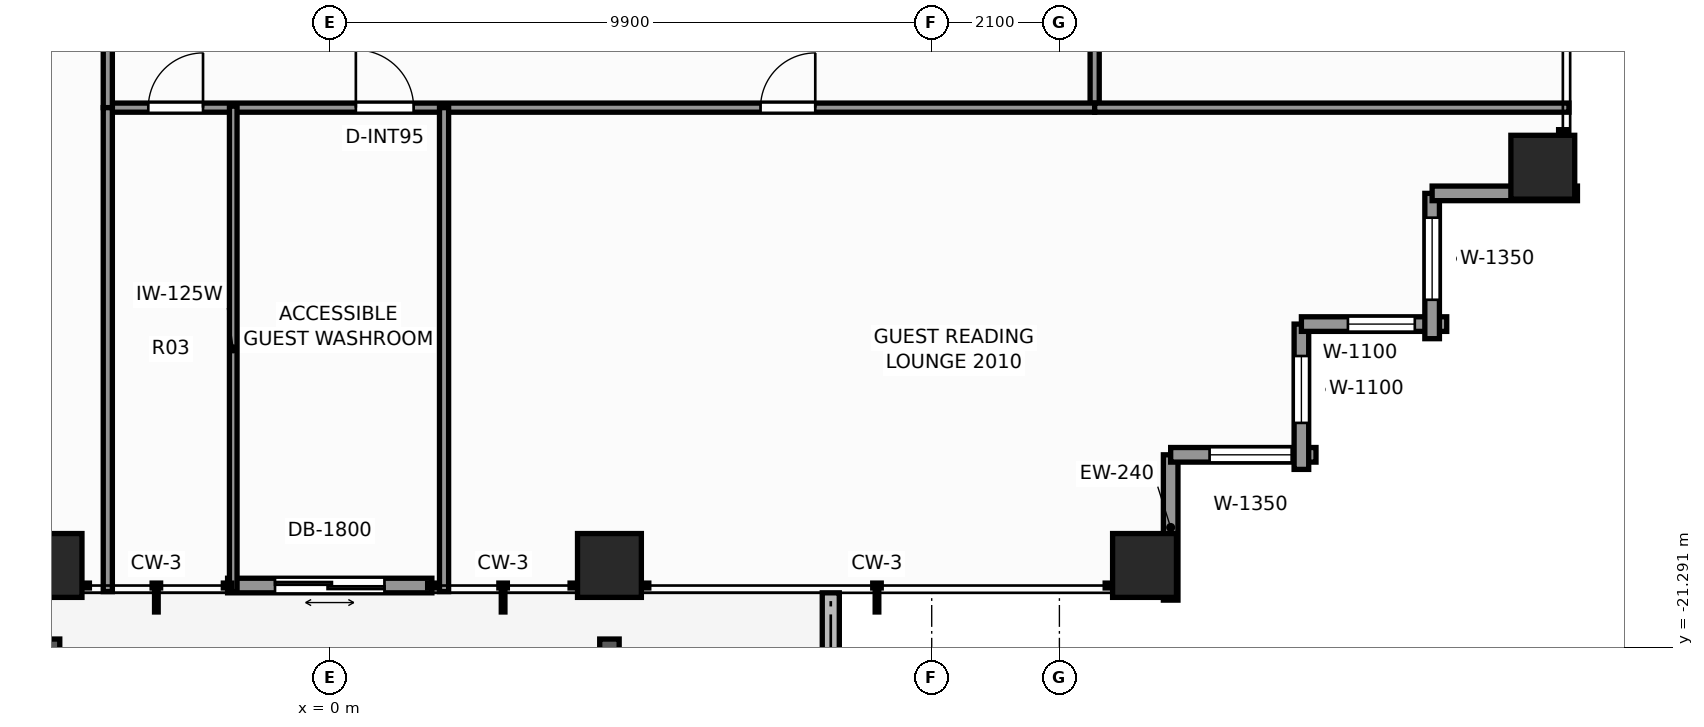
"""IFC4 building model, lengths in metres.
Left out: names, types, materials, properties, quantities, classifications, styles, units other than length and angle.
Written with IfcOpenShell. Run it as: python <this file> out.ifc"""

import sys

from ifc_helpers import new_model, si_unit, direction, frame, frame_2d, origin, origin_2d, place, context, subcontext, project, spatial, rectangle, extrude, element, fill, save


model = new_model("IFC4")
c1 = context("Model", 3, precision=1e-05, world=origin(), true_north=direction((0.0, 1.0)))
c2 = subcontext(c1, "Body", "Model", "MODEL_VIEW")
j1 = project(units=[si_unit("LENGTHUNIT", "METRE"), si_unit("PLANEANGLEUNIT", "RADIAN")], contexts=[c1])
p1 = place(None, origin())
s1 = spatial("IfcSite", under=j1, at=p1, CompositionType="ELEMENT")
p2 = place(p1, origin())
s2 = spatial("IfcBuilding", under=s1, at=p2, CompositionType="ELEMENT")
p3 = place(p2, frame((0.0, 0.0, 72.2)))
s3 = spatial("IfcBuildingStorey", under=s2, at=p3, CompositionType="ELEMENT", Elevation=72.2)
for number, where, z_axis, x_axis in (
    (1, (-4.6, -19.95, 0.0), (0.0, 0.0, 1.0), (1.0, 0.0, 0.0)),
    (2, (4.6, -19.95, 0.0), (0.0, 0.0, 1.0), (1.0, 0.0, 0.0)),
    (3, (13.4, -19.95, 0.0), (0.0, 0.0, 1.0), (1.0, 0.0, 0.0)),
    (4, (19.95, -13.4, 0.0), (0.0, 0.0, 1.0), (1.0, 0.0, 0.0)),
):
    element("IfcColumn", number, at=place(p3, frame(where, z_axis=z_axis, x_axis=x_axis)), inside=s3, PredefinedType="COLUMN", context=c2, shape_type="SweptSolid", body=[
        extrude(rectangle(XDim=1.05, YDim=1.05, at=origin_2d()), origin(), (0.0, 0.0, 1.0), 3.3),
    ])
p4 = place(p3, frame((8.24, -23.074, -0.04), z_axis=(0.0, 0.0, 1.0), x_axis=(0.0, 1.0, 0.0)))
e5 = element("IfcWall", 5, at=p4, inside=s3, PredefinedType="PARAPET", context=c2, shape_type="SweptSolid", body=[
    extrude(rectangle(XDim=2.674, YDim=0.28, at=frame_2d((1.337, 0.0))), origin(), (0.0, 0.0, 1.0), 0.42),
])
p5 = place(p3, frame((1.68, -20.28, 0.0), z_axis=(0.0, 0.0, 1.0), x_axis=(-1.0, 0.0, 0.0)))
e6 = element("IfcWall", 6, at=p5, inside=s3, PredefinedType="STANDARD", context=c2, shape_type="SweptSolid", body=[
    extrude(rectangle(XDim=3.36, YDim=0.24, at=frame_2d((1.68, 0.0))), origin(), (0.0, 0.0, 1.0), 3.08),
])
p6 = place(p5, frame((0.78, 0.0, 0.0)))
e7 = element("IfcOpeningElement", 7, at=p6, cuts=e6, PredefinedType="OPENING", context=c2, shape_type="SweptSolid", body=[
    extrude(rectangle(XDim=1.8, YDim=2.2, at=frame_2d((0.9, 1.1))), frame((0.0, 0.13, 0.0), z_axis=(0.0, -1.0, 0.0), x_axis=(1.0, 0.0, 0.0)), (0.0, 0.0, 1.0), 0.26),
])
p7 = place(p3, frame((13.83, -18.13, 0.0), z_axis=(0.0, 0.0, 1.0), x_axis=(0.0, -1.0, 0.0)))
e8 = element("IfcWall", 8, at=p7, inside=s3, PredefinedType="STANDARD", context=c2, shape_type="SweptSolid", body=[
    extrude(rectangle(XDim=2.39, YDim=0.24, at=frame_2d((1.195, 0.0))), origin(), (0.0, 0.0, 1.0), 2.459),
])
p8 = place(p3, frame((16.22, -18.13, 0.0), z_axis=(0.0, 0.0, 1.0), x_axis=(-1.0, 0.0, 0.0)))
e9 = element("IfcWall", 9, at=p8, inside=s3, PredefinedType="STANDARD", context=c2, shape_type="SweptSolid", body=[
    extrude(rectangle(XDim=2.39, YDim=0.24, at=frame_2d((1.195, 0.0))), origin(), (0.0, 0.0, 1.0), 2.459),
])
p9 = place(p8, frame((0.4, 0.0, 0.65)))
e10 = element("IfcOpeningElement", 10, at=p9, cuts=e9, PredefinedType="OPENING", context=c2, shape_type="SweptSolid", body=[
    extrude(rectangle(XDim=1.35, YDim=1.55, at=frame_2d((0.675, 0.775))), frame((0.0, 0.13, 0.0), z_axis=(0.0, -1.0, 0.0), x_axis=(1.0, 0.0, 0.0)), (0.0, 0.0, 1.0), 0.26),
])
p10 = place(p3, frame((15.98, -15.98, 0.0), z_axis=(0.0, 0.0, 1.0), x_axis=(0.0, -1.0, 0.0)))
e11 = element("IfcWall", 11, at=p10, inside=s3, PredefinedType="STANDARD", context=c2, shape_type="SweptSolid", body=[
    extrude(rectangle(XDim=2.39, YDim=0.24, at=frame_2d((1.195, 0.0))), origin(), (0.0, 0.0, 1.0), 2.459),
])
p11 = place(p10, frame((0.525, 0.0, 0.65)))
e12 = element("IfcOpeningElement", 12, at=p11, cuts=e11, PredefinedType="OPENING", context=c2, shape_type="SweptSolid", body=[
    extrude(rectangle(XDim=1.1, YDim=1.45, at=frame_2d((0.55, 0.725))), frame((0.0, 0.13, 0.0), z_axis=(0.0, -1.0, 0.0), x_axis=(1.0, 0.0, 0.0)), (0.0, 0.0, 1.0), 0.26),
])
p12 = place(p3, frame((18.37, -15.98, 0.0), z_axis=(0.0, 0.0, 1.0), x_axis=(-1.0, 0.0, 0.0)))
e13 = element("IfcWall", 13, at=p12, inside=s3, PredefinedType="STANDARD", context=c2, shape_type="SweptSolid", body=[
    extrude(rectangle(XDim=2.39, YDim=0.24, at=frame_2d((1.195, 0.0))), origin(), (0.0, 0.0, 1.0), 2.459),
])
p13 = place(p12, frame((0.525, 0.0, 0.65)))
e14 = element("IfcOpeningElement", 14, at=p13, cuts=e13, PredefinedType="OPENING", context=c2, shape_type="SweptSolid", body=[
    extrude(rectangle(XDim=1.1, YDim=1.45, at=frame_2d((0.55, 0.725))), frame((0.0, 0.13, 0.0), z_axis=(0.0, -1.0, 0.0), x_axis=(1.0, 0.0, 0.0)), (0.0, 0.0, 1.0), 0.26),
])
p14 = place(p3, frame((18.13, -13.83, 0.0), z_axis=(0.0, 0.0, 1.0), x_axis=(0.0, -1.0, 0.0)))
e15 = element("IfcWall", 15, at=p14, inside=s3, PredefinedType="STANDARD", context=c2, shape_type="SweptSolid", body=[
    extrude(rectangle(XDim=2.39, YDim=0.24, at=frame_2d((1.195, 0.0))), origin(), (0.0, 0.0, 1.0), 2.459),
])
p15 = place(p14, frame((0.4, 0.0, 0.65)))
e16 = element("IfcOpeningElement", 16, at=p15, cuts=e15, PredefinedType="OPENING", context=c2, shape_type="SweptSolid", body=[
    extrude(rectangle(XDim=1.35, YDim=1.55, at=frame_2d((0.675, 0.775))), frame((0.0, 0.13, 0.0), z_axis=(0.0, -1.0, 0.0), x_axis=(1.0, 0.0, 0.0)), (0.0, 0.0, 1.0), 0.26),
])
p16 = place(p3, frame((20.52, -13.83, 0.0), z_axis=(0.0, 0.0, 1.0), x_axis=(-1.0, 0.0, 0.0)))
e17 = element("IfcWall", 17, at=p16, inside=s3, PredefinedType="STANDARD", context=c2, shape_type="SweptSolid", body=[
    extrude(rectangle(XDim=2.39, YDim=0.24, at=frame_2d((1.195, 0.0))), origin(), (0.0, 0.0, 1.0), 2.459),
])
p17 = place(p3, frame((12.58, -12.42, 0.0), z_axis=(0.0, 0.0, 1.0), x_axis=(0.0, 1.0, 0.0)))
e18 = element("IfcWall", 18, at=p17, inside=s3, PredefinedType="PARTITIONING", context=c2, shape_type="SweptSolid", body=[
    extrude(rectangle(XDim=24.84, YDim=0.15, at=frame_2d((12.42, 0.0))), origin(), (0.0, 0.0, 1.0), 2.292),
])
p18 = place(p17, frame((4.435, 0.0, 0.0)))
e19 = element("IfcOpeningElement", 19, at=p18, cuts=e18, PredefinedType="OPENING", context=c2, shape_type="SweptSolid", body=[
    extrude(rectangle(XDim=0.9, YDim=2.06, at=frame_2d((0.45, 1.03))), frame((0.0, 0.085, 0.0), z_axis=(0.0, -1.0, 0.0), x_axis=(1.0, 0.0, 0.0)), (0.0, 0.0, 1.0), 0.17),
])
p19 = place(p17, frame((13.941, 0.0, 0.0)))
e20 = element("IfcOpeningElement", 20, at=p19, cuts=e18, PredefinedType="OPENING", context=c2, shape_type="SweptSolid", body=[
    extrude(rectangle(XDim=0.9, YDim=2.06, at=frame_2d((0.45, 1.03))), frame((0.0, 0.085, 0.0), z_axis=(0.0, -1.0, 0.0), x_axis=(1.0, 0.0, 0.0)), (0.0, 0.0, 1.0), 0.17),
])
p20 = place(p17, frame((18.322, 0.0, 0.0)))
e21 = element("IfcOpeningElement", 21, at=p20, cuts=e18, PredefinedType="OPENING", context=c2, shape_type="SweptSolid", body=[
    extrude(rectangle(XDim=0.9, YDim=2.06, at=frame_2d((0.45, 1.03))), frame((0.0, 0.085, 0.0), z_axis=(0.0, -1.0, 0.0), x_axis=(1.0, 0.0, 0.0)), (0.0, 0.0, 1.0), 0.17),
])
p21 = place(p17, frame((20.442, 0.0, 0.0)))
e22 = element("IfcOpeningElement", 22, at=p21, cuts=e18, PredefinedType="OPENING", context=c2, shape_type="SweptSolid", body=[
    extrude(rectangle(XDim=0.95, YDim=2.06, at=frame_2d((0.475, 1.03))), frame((0.0, 0.085, 0.0), z_axis=(0.0, -1.0, 0.0), x_axis=(1.0, 0.0, 0.0)), (0.0, 0.0, 1.0), 0.17),
])
p22 = place(p3, frame((-3.65, -12.42, 0.0), z_axis=(0.0, 0.0, 1.0), x_axis=(1.0, 0.0, 0.0)))
e23 = element("IfcWall", 23, at=p22, inside=s3, PredefinedType="PARTITIONING", context=c2, shape_type="SweptSolid", body=[
    extrude(rectangle(XDim=16.23, YDim=0.15, at=frame_2d((8.115, 0.0))), origin(), (0.0, 0.0, 1.0), 2.292),
])
p23 = place(p22, frame((0.666, 0.0, 0.0)))
e24 = element("IfcOpeningElement", 24, at=p23, cuts=e23, PredefinedType="OPENING", context=c2, shape_type="SweptSolid", body=[
    extrude(rectangle(XDim=0.9, YDim=2.06, at=frame_2d((0.45, 1.03))), frame((0.0, 0.085, 0.0), z_axis=(0.0, -1.0, 0.0), x_axis=(1.0, 0.0, 0.0)), (0.0, 0.0, 1.0), 0.17),
])
p24 = place(p22, frame((4.08, 0.0, 0.0)))
e25 = element("IfcOpeningElement", 25, at=p24, cuts=e23, PredefinedType="OPENING", context=c2, shape_type="SweptSolid", body=[
    extrude(rectangle(XDim=0.95, YDim=2.06, at=frame_2d((0.475, 1.03))), frame((0.0, 0.085, 0.0), z_axis=(0.0, -1.0, 0.0), x_axis=(1.0, 0.0, 0.0)), (0.0, 0.0, 1.0), 0.17),
])
p25 = place(p22, frame((10.735, 0.0, 0.0)))
e26 = element("IfcOpeningElement", 26, at=p25, cuts=e23, PredefinedType="OPENING", context=c2, shape_type="SweptSolid", body=[
    extrude(rectangle(XDim=0.9, YDim=2.06, at=frame_2d((0.45, 1.03))), frame((0.0, 0.085, 0.0), z_axis=(0.0, -1.0, 0.0), x_axis=(1.0, 0.0, 0.0)), (0.0, 0.0, 1.0), 0.17),
])
p26 = place(p3, frame((-3.65, -12.42, 0.0), z_axis=(0.0, 0.0, 1.0), x_axis=(0.0, 1.0, 0.0)))
e27 = element("IfcWall", 27, at=p26, inside=s3, PredefinedType="PARTITIONING", context=c2, shape_type="SweptSolid", body=[
    extrude(rectangle(XDim=2.52, YDim=0.15, at=frame_2d((1.26, 0.0))), origin(), (0.0, 0.0, 1.0), 3.08),
])
p27 = place(p3, frame((12.58, -12.42, 0.0), z_axis=(0.0, 0.0, 1.0), x_axis=(1.0, 0.0, 0.0)))
e28 = element("IfcWall", 28, at=p27, inside=s3, PredefinedType="PARTITIONING", context=c2, shape_type="SweptSolid", body=[
    extrude(rectangle(XDim=7.8, YDim=0.15, at=frame_2d((3.9, 0.0))), origin(), (0.0, 0.0, 1.0), 2.292),
])
for number, where, z_axis, x_axis in (
    (29, (-3.65, -20.38, 0.0), (0.0, 0.0, 1.0), (0.0, 1.0, 0.0)),
    (30, (1.88, -20.38, 0.0), (0.0, 0.0, 1.0), (0.0, 1.0, 0.0)),
):
    element("IfcWall", number, at=place(p3, frame(where, z_axis=z_axis, x_axis=x_axis)), inside=s3, PredefinedType="PARTITIONING", context=c2, shape_type="SweptSolid", body=[
        extrude(rectangle(XDim=7.96, YDim=0.15, at=frame_2d((3.98, 0.0))), origin(), (0.0, 0.0, 1.0), 2.449),
    ])
p28 = place(p3, frame((-1.587, -20.38, 0.0), z_axis=(0.0, 0.0, 1.0), x_axis=(0.0, 1.0, 0.0)))
e31 = element("IfcWall", 31, at=p28, inside=s3, PredefinedType="PARTITIONING", context=c2, shape_type="SweptSolid", body=[
    extrude(rectangle(XDim=7.985, YDim=0.125, at=frame_2d((3.992, 0.0))), origin(), (0.0, 0.0, 1.0), 2.449),
])
p29 = place(p6, origin())
e32 = element("IfcDoor", 32, at=p29, inside=s3, OperationType="DOUBLE_DOOR_SLIDING", PredefinedType="DOOR", context=c2, shape_type="SweptSolid", body=[
    extrude(rectangle(XDim=1.8, YDim=2.2, at=frame_2d((0.9, 1.1))), frame((0.0, 0.025, 0.0), z_axis=(0.0, -1.0, 0.0), x_axis=(1.0, 0.0, 0.0)), (0.0, 0.0, 1.0), 0.05),
])
fill(e7, e32)
p30 = place(p9, origin())
e33 = element("IfcWindow", 33, at=p30, inside=s3, PartitioningType="SINGLE_PANEL", PredefinedType="WINDOW", context=c2, shape_type="SweptSolid", body=[
    extrude(rectangle(XDim=1.35, YDim=1.55, at=frame_2d((0.675, 0.775))), frame((0.0, 0.03, 0.0), z_axis=(0.0, -1.0, 0.0), x_axis=(1.0, 0.0, 0.0)), (0.0, 0.0, 1.0), 0.06),
])
fill(e10, e33)
p31 = place(p11, origin())
e34 = element("IfcWindow", 34, at=p31, inside=s3, PartitioningType="SINGLE_PANEL", PredefinedType="WINDOW", context=c2, shape_type="SweptSolid", body=[
    extrude(rectangle(XDim=1.1, YDim=1.45, at=frame_2d((0.55, 0.725))), frame((0.0, 0.03, 0.0), z_axis=(0.0, -1.0, 0.0), x_axis=(1.0, 0.0, 0.0)), (0.0, 0.0, 1.0), 0.06),
])
fill(e12, e34)
p32 = place(p13, origin())
e35 = element("IfcWindow", 35, at=p32, inside=s3, PartitioningType="SINGLE_PANEL", PredefinedType="WINDOW", context=c2, shape_type="SweptSolid", body=[
    extrude(rectangle(XDim=1.1, YDim=1.45, at=frame_2d((0.55, 0.725))), frame((0.0, 0.03, 0.0), z_axis=(0.0, -1.0, 0.0), x_axis=(1.0, 0.0, 0.0)), (0.0, 0.0, 1.0), 0.06),
])
fill(e14, e35)
p33 = place(p15, origin())
e36 = element("IfcWindow", 36, at=p33, inside=s3, PartitioningType="SINGLE_PANEL", PredefinedType="WINDOW", context=c2, shape_type="SweptSolid", body=[
    extrude(rectangle(XDim=1.35, YDim=1.55, at=frame_2d((0.675, 0.775))), frame((0.0, 0.03, 0.0), z_axis=(0.0, -1.0, 0.0), x_axis=(1.0, 0.0, 0.0)), (0.0, 0.0, 1.0), 0.06),
])
fill(e16, e36)
p34 = place(p23, origin())
e37 = element("IfcDoor", 37, at=p34, inside=s3, OperationType="SINGLE_SWING_RIGHT", PredefinedType="DOOR", context=c2, shape_type="SweptSolid", body=[
    extrude(rectangle(XDim=0.9, YDim=2.06, at=frame_2d((0.45, 1.03))), frame((0.0, 0.025, 0.0), z_axis=(0.0, -1.0, 0.0), x_axis=(1.0, 0.0, 0.0)), (0.0, 0.0, 1.0), 0.05),
])
fill(e24, e37)
p35 = place(p24, origin())
e38 = element("IfcDoor", 38, at=p35, inside=s3, OperationType="SINGLE_SWING_LEFT", PredefinedType="DOOR", context=c2, shape_type="SweptSolid", body=[
    extrude(rectangle(XDim=0.95, YDim=2.06, at=frame_2d((0.475, 1.03))), frame((0.0, 0.025, 0.0), z_axis=(0.0, -1.0, 0.0), x_axis=(1.0, 0.0, 0.0)), (0.0, 0.0, 1.0), 0.05),
])
fill(e25, e38)
p36 = place(p25, origin())
e39 = element("IfcDoor", 39, at=p36, inside=s3, OperationType="SINGLE_SWING_RIGHT", PredefinedType="DOOR", context=c2, shape_type="SweptSolid", body=[
    extrude(rectangle(XDim=0.9, YDim=2.06, at=frame_2d((0.45, 1.03))), frame((0.0, 0.025, 0.0), z_axis=(0.0, -1.0, 0.0), x_axis=(1.0, 0.0, 0.0)), (0.0, 0.0, 1.0), 0.05),
])
fill(e26, e39)
save(model, sys.argv[1])
